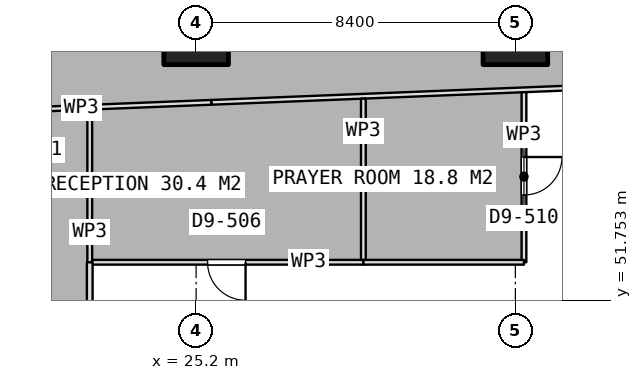
"""IFC4 building model, lengths in metres.
Left out: names, types, materials, properties, quantities, classifications, styles, units other than length and angle.
Written with IfcOpenShell. Run it as: python <this file> out.ifc"""

import sys

from ifc_helpers import new_model, si_unit, direction, frame, frame_2d, origin, origin_2d, place, context, subcontext, project, spatial, rectangle, extrude, element, fill, save


model = new_model("IFC4")
c1 = context("Model", 3, precision=1e-05, world=origin(), true_north=direction((0.0, 1.0)))
c2 = subcontext(c1, "Body", "Model", "MODEL_VIEW")
j1 = project(units=[si_unit("LENGTHUNIT", "METRE"), si_unit("PLANEANGLEUNIT", "RADIAN")], contexts=[c1])
p1 = place(None, origin())
s1 = spatial("IfcSite", under=j1, at=p1, CompositionType="ELEMENT")
p2 = place(p1, origin())
s2 = spatial("IfcBuilding", under=s1, at=p2, CompositionType="ELEMENT")
p3 = place(p2, frame((0.0, 0.0, 129.05)))
s3 = spatial("IfcBuildingStorey", under=s2, at=p3, CompositionType="ELEMENT", Elevation=129.05)
for number, where, z_axis, x_axis in (
    (1, (25.2, 58.8, 0.0), (0.0, 0.0, 1.0), (1.0, 0.0, 0.0)),
    (2, (33.6, 58.8, 0.0), (0.0, 0.0, 1.0), (1.0, 0.0, 0.0)),
):
    element("IfcColumn", number, at=place(p3, frame(where, z_axis=z_axis, x_axis=x_axis)), inside=s3, PredefinedType="COLUMN", context=c2, shape_type="SweptSolid", body=[
        extrude(rectangle(XDim=1.7, YDim=1.7, at=origin_2d()), origin(), (0.0, 0.0, 1.0), 3.75),
    ])
p4 = place(p3, frame((35.198, 57.342, 0.0), z_axis=(0.0, 0.0, 1.0), x_axis=(-0.99920063391, -0.039976157823, 0.0)))
e3 = element("IfcWall", 3, at=p4, inside=s3, PredefinedType="PARTITIONING", context=c2, shape_type="SweptSolid", body=[
    extrude(rectangle(XDim=9.606, YDim=0.125, at=frame_2d((4.803, 0.0))), origin(), (0.0, 0.0, 1.0), 3.5),
])
p5 = place(p3, frame((25.599, 56.958, 0.0), z_axis=(0.0, 0.0, 1.0), x_axis=(-0.999198008703, -0.04004172078, 0.0)))
e4 = element("IfcWall", 4, at=p5, inside=s3, PredefinedType="PARTITIONING", context=c2, shape_type="SweptSolid", body=[
    extrude(rectangle(XDim=9.792, YDim=0.125, at=frame_2d((4.896, 0.0))), origin(), (0.0, 0.0, 1.0), 3.5),
])
p6 = place(p5, frame((4.396, 0.0, 0.0)))
e5 = element("IfcOpeningElement", 5, at=p6, cuts=e4, PredefinedType="OPENING", context=c2, shape_type="SweptSolid", body=[
    extrude(rectangle(XDim=1.0, YDim=2.1, at=frame_2d((0.5, 1.05))), frame((0.0, 0.073, 0.0), z_axis=(0.0, -1.0, 0.0), x_axis=(1.0, 0.0, 0.0)), (0.0, 0.0, 1.0), 0.145),
])
p7 = place(p3, frame((29.6, 57.056, 0.0), z_axis=(0.0, 0.0, 1.0), x_axis=(0.0, -1.0, 0.0)))
e6 = element("IfcWall", 6, at=p7, inside=s3, PredefinedType="PARTITIONING", context=c2, shape_type="SweptSolid", body=[
    extrude(rectangle(XDim=4.306, YDim=0.125, at=frame_2d((2.153, 0.0))), origin(), (0.0, 0.0, 1.0), 3.5),
])
p8 = place(p3, frame((29.6, 52.75, 0.0), z_axis=(0.0, 0.0, 1.0), x_axis=(-1.0, 0.0, 0.0)))
e7 = element("IfcWall", 7, at=p8, inside=s3, PredefinedType="PARTITIONING", context=c2, shape_type="SweptSolid", body=[
    extrude(rectangle(XDim=7.2, YDim=0.125, at=frame_2d((3.6, 0.0))), origin(), (0.0, 0.0, 1.0), 3.5),
])
p9 = place(p8, frame((3.1, 0.0, 0.0)))
e8 = element("IfcOpeningElement", 8, at=p9, cuts=e7, PredefinedType="OPENING", context=c2, shape_type="SweptSolid", body=[
    extrude(rectangle(XDim=1.0, YDim=2.1, at=frame_2d((0.5, 1.05))), frame((0.0, 0.073, 0.0), z_axis=(0.0, -1.0, 0.0), x_axis=(1.0, 0.0, 0.0)), (0.0, 0.0, 1.0), 0.145),
])
p10 = place(p3, frame((22.4, 52.75, 0.0), z_axis=(0.0, 0.0, 1.0), x_axis=(0.0, 1.0, 0.0)))
e9 = element("IfcWall", 9, at=p10, inside=s3, PredefinedType="PARTITIONING", context=c2, shape_type="SweptSolid", body=[
    extrude(rectangle(XDim=4.017, YDim=0.125, at=frame_2d((2.009, 0.0))), origin(), (0.0, 0.0, 1.0), 3.5),
])
p11 = place(p3, frame((33.826, 57.225, 0.0), z_axis=(0.0, 0.0, 1.0), x_axis=(0.0, -1.0, 0.0)))
e10 = element("IfcWall", 10, at=p11, inside=s3, PredefinedType="PARTITIONING", context=c2, shape_type="SweptSolid", body=[
    extrude(rectangle(XDim=4.475, YDim=0.125, at=frame_2d((2.238, 0.0))), origin(), (0.0, 0.0, 1.0), 3.5),
])
p12 = place(p11, frame((1.706, 0.0, 0.0)))
e11 = element("IfcOpeningElement", 11, at=p12, cuts=e10, PredefinedType="OPENING", context=c2, shape_type="SweptSolid", body=[
    extrude(rectangle(XDim=1.0, YDim=2.1, at=frame_2d((0.5, 1.05))), frame((0.0, 0.073, 0.0), z_axis=(0.0, -1.0, 0.0), x_axis=(1.0, 0.0, 0.0)), (0.0, 0.0, 1.0), 0.145),
])
p13 = place(p3, frame((33.826, 52.75, 0.0), z_axis=(0.0, 0.0, 1.0), x_axis=(-1.0, 0.0, 0.0)))
e12 = element("IfcWall", 12, at=p13, inside=s3, PredefinedType="PARTITIONING", context=c2, shape_type="SweptSolid", body=[
    extrude(rectangle(XDim=4.226, YDim=0.125, at=frame_2d((2.113, 0.0))), origin(), (0.0, 0.0, 1.0), 3.5),
])
p14 = place(p3, frame((22.4, 52.75, 0.0), z_axis=(0.0, 0.0, 1.0), x_axis=(0.0, -1.0, 0.0)))
e13 = element("IfcWall", 13, at=p14, inside=s3, PredefinedType="PARTITIONING", context=c2, shape_type="SweptSolid", body=[
    extrude(rectangle(XDim=9.877, YDim=0.15, at=frame_2d((4.938, 0.0))), origin(), (0.0, 0.0, 1.0), 3.5),
])
p15 = place(p14, frame((4.439, 0.0, 0.0)))
e14 = element("IfcOpeningElement", 14, at=p15, cuts=e13, PredefinedType="OPENING", context=c2, shape_type="SweptSolid", body=[
    extrude(rectangle(XDim=1.0, YDim=2.1, at=frame_2d((0.5, 1.05))), frame((0.0, 0.085, 0.0), z_axis=(0.0, -1.0, 0.0), x_axis=(1.0, 0.0, 0.0)), (0.0, 0.0, 1.0), 0.17),
])
p16 = place(p9, origin())
e15 = element("IfcDoor", 15, at=p16, inside=s3, OperationType="SINGLE_SWING_LEFT", PredefinedType="DOOR", context=c2, shape_type="SweptSolid", body=[
    extrude(rectangle(XDim=1.0, YDim=2.1, at=frame_2d((0.5, 1.05))), frame((0.0, 0.025, 0.0), z_axis=(0.0, -1.0, 0.0), x_axis=(1.0, 0.0, 0.0)), (0.0, 0.0, 1.0), 0.05),
])
fill(e8, e15)
p17 = place(p12, origin())
e16 = element("IfcDoor", 16, at=p17, inside=s3, OperationType="SINGLE_SWING_LEFT", PredefinedType="DOOR", context=c2, shape_type="SweptSolid", body=[
    extrude(rectangle(XDim=1.0, YDim=2.1, at=frame_2d((0.5, 1.05))), frame((0.0, 0.025, 0.0), z_axis=(0.0, -1.0, 0.0), x_axis=(1.0, 0.0, 0.0)), (0.0, 0.0, 1.0), 0.05),
])
fill(e11, e16)
save(model, sys.argv[1])
